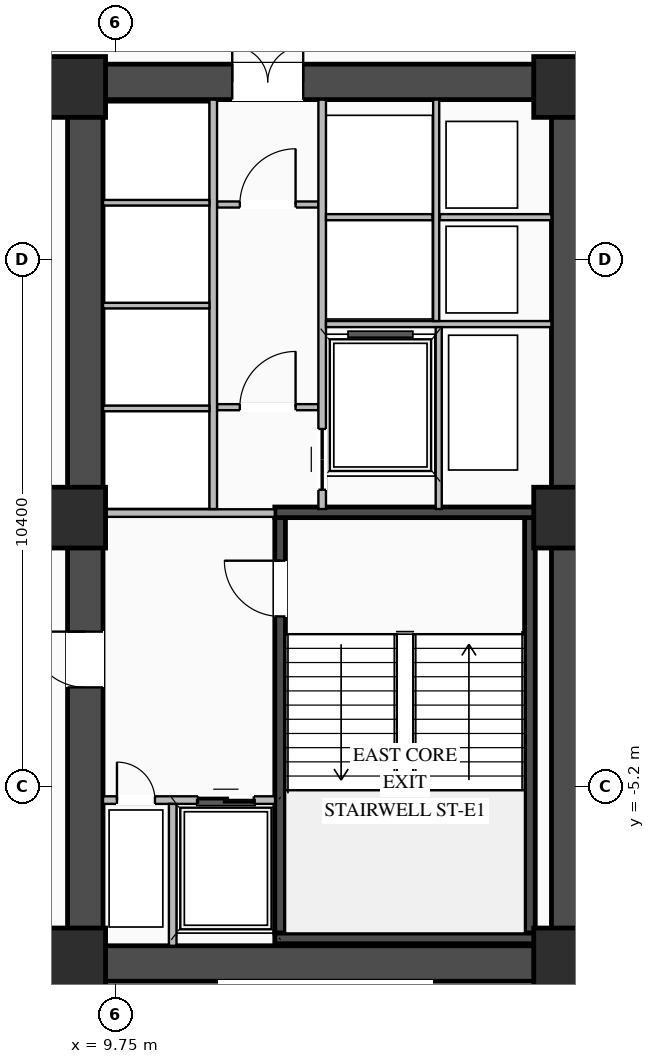
"""IFC4 building model, lengths in metres.
Left out: names, types, materials, properties, quantities, classifications, styles, units other than length and angle.
Written with IfcOpenShell. Run it as: python <this file> out.ifc"""

import sys

from ifc_helpers import new_model, si_unit, direction, frame, frame_2d, origin, origin_2d, place, context, subcontext, project, spatial, rectangle, extrude, element, fill, save


model = new_model("IFC4")
c1 = context("Model", 3, precision=1e-05, world=origin(), true_north=direction((0.0, 1.0)))
c2 = subcontext(c1, "Body", "Model", "MODEL_VIEW")
j1 = project(units=[si_unit("LENGTHUNIT", "METRE"), si_unit("PLANEANGLEUNIT", "RADIAN")], contexts=[c1])
p1 = place(None, origin())
s1 = spatial("IfcSite", under=j1, at=p1, CompositionType="ELEMENT")
p2 = place(p1, origin())
s2 = spatial("IfcBuilding", under=s1, at=p2, CompositionType="ELEMENT")
p3 = place(p2, frame((0.0, 0.0, 9.6)))
s3 = spatial("IfcBuildingStorey", under=s2, at=p3, CompositionType="ELEMENT", Elevation=9.6)
p4 = place(p3, frame((8.8, -8.7, 0.0), z_axis=(0.0, 0.0, 1.0), x_axis=(1.0, 0.0, 0.0)))
e1 = element("IfcWall", 1, at=p4, inside=s3, PredefinedType="SHEAR", context=c2, shape_type="SweptSolid", body=[
    extrude(rectangle(XDim=10.25, YDim=0.7, at=frame_2d((5.125, 0.0))), origin(), (0.0, 0.0, 1.0), 4.25),
])
p5 = place(p3, frame((8.8, 8.7, 0.0), z_axis=(0.0, 0.0, 1.0), x_axis=(1.0, 0.0, 0.0)))
e2 = element("IfcWall", 2, at=p5, inside=s3, PredefinedType="SHEAR", context=c2, shape_type="SweptSolid", body=[
    extrude(rectangle(XDim=10.25, YDim=0.7, at=frame_2d((5.125, 0.0))), origin(), (0.0, 0.0, 1.0), 4.25),
])
p6 = place(p5, frame((3.25, 0.0, 0.0)))
e3 = element("IfcOpeningElement", 3, at=p6, cuts=e2, PredefinedType="OPENING", context=c2, shape_type="SweptSolid", body=[
    extrude(rectangle(XDim=1.4, YDim=2.05, at=frame_2d((0.7, 1.025))), frame((0.0, 0.36, 0.0), z_axis=(0.0, -1.0, 0.0), x_axis=(1.0, 0.0, 0.0)), (0.0, 0.0, 1.0), 0.72),
])
p7 = place(p3, frame((9.15, -8.35, 0.0), z_axis=(0.0, 0.0, 1.0), x_axis=(0.0, 1.0, 0.0)))
e4 = element("IfcWall", 4, at=p7, inside=s3, PredefinedType="SHEAR", context=c2, shape_type="SweptSolid", body=[
    extrude(rectangle(XDim=16.7, YDim=0.7, at=frame_2d((8.35, 0.0))), origin(), (0.0, 0.0, 1.0), 4.25),
])
p8 = place(p7, frame((5.1, 0.0, 0.0)))
e5 = element("IfcOpeningElement", 5, at=p8, cuts=e4, PredefinedType="OPENING", context=c2, shape_type="SweptSolid", body=[
    extrude(rectangle(XDim=1.1, YDim=2.08, at=frame_2d((0.55, 1.04))), frame((0.0, 0.36, 0.0), z_axis=(0.0, -1.0, 0.0), x_axis=(1.0, 0.0, 0.0)), (0.0, 0.0, 1.0), 0.72),
])
p9 = place(p3, frame((18.7, -8.35, 0.0), z_axis=(0.0, 0.0, 1.0), x_axis=(0.0, 1.0, 0.0)))
e6 = element("IfcWall", 6, at=p9, inside=s3, PredefinedType="SHEAR", context=c2, shape_type="SweptSolid", body=[
    extrude(rectangle(XDim=16.7, YDim=0.7, at=frame_2d((8.35, 0.0))), origin(), (0.0, 0.0, 1.0), 4.25),
])
p10 = place(p3, frame((12.995, -8.1, 0.0), z_axis=(0.0, 0.0, 1.0), x_axis=(0.0, 1.0, 0.0)))
e7 = element("IfcWall", 7, at=p10, inside=s3, PredefinedType="SHEAR", context=c2, shape_type="SweptSolid", body=[
    extrude(rectangle(XDim=8.2, YDim=0.21, at=frame_2d((4.1, 0.0))), origin(), (0.0, 0.0, 1.0), 4.25),
])
p11 = place(p10, frame((6.25, 0.0, 0.0)))
e8 = element("IfcOpeningElement", 8, at=p11, cuts=e7, PredefinedType="OPENING", context=c2, shape_type="SweptSolid", body=[
    extrude(rectangle(XDim=1.1, YDim=2.15, at=frame_2d((0.55, 1.075))), frame((0.0, 0.115, 0.0), z_axis=(0.0, -1.0, 0.0), x_axis=(1.0, 0.0, 0.0)), (0.0, 0.0, 1.0), 0.23),
])
p12 = place(p3, frame((17.925, -8.1, 0.0), z_axis=(0.0, 0.0, 1.0), x_axis=(0.0, 1.0, 0.0)))
e9 = element("IfcWall", 9, at=p12, inside=s3, PredefinedType="SHEAR", context=c2, shape_type="SweptSolid", body=[
    extrude(rectangle(XDim=8.2, YDim=0.21, at=frame_2d((4.1, 0.0))), origin(), (0.0, 0.0, 1.0), 4.25),
])
for number, where, z_axis, x_axis in (
    (10, (12.89, -8.205, 0.0), (0.0, 0.0, 1.0), (1.0, 0.0, 0.0)),
    (11, (18.03, 0.205, 0.0), (0.0, 0.0, 1.0), (-1.0, 0.0, 0.0)),
):
    element("IfcWall", number, at=place(p3, frame(where, z_axis=z_axis, x_axis=x_axis)), inside=s3, PredefinedType="SHEAR", context=c2, shape_type="SweptSolid", body=[
        extrude(rectangle(XDim=5.14, YDim=0.21, at=frame_2d((2.57, 0.0))), origin(), (0.0, 0.0, 1.0), 4.25),
    ])
for number, where, z_axis, x_axis in (
    (12, (8.95, -8.6, 0.0), (0.0, 0.0, 1.0), (1.0, 0.0, 0.0)),
    (13, (8.95, 0.1, 0.0), (0.0, 0.0, 1.0), (1.0, 0.0, 0.0)),
    (14, (8.95, 8.6, 0.0), (0.0, 0.0, 1.0), (1.0, 0.0, 0.0)),
    (15, (18.6, -8.6, 0.0), (0.0, 0.0, 1.0), (1.0, 0.0, 0.0)),
    (16, (18.6, 0.1, 0.0), (0.0, 0.0, 1.0), (1.0, 0.0, 0.0)),
    (17, (18.6, 8.6, 0.0), (0.0, 0.0, 1.0), (1.0, 0.0, 0.0)),
):
    element("IfcColumn", number, at=place(p3, frame(where, z_axis=z_axis, x_axis=x_axis)), inside=s3, PredefinedType="COLUMN", context=c2, shape_type="SweptSolid", body=[
        extrude(rectangle(XDim=1.2, YDim=1.2, at=origin_2d()), origin(), (0.0, 0.0, 1.0), 4.5),
    ])
p13 = place(p3, frame((9.5, -5.475, 0.0), z_axis=(0.0, 0.0, 1.0), x_axis=(1.0, 0.0, 0.0)))
e18 = element("IfcWall", 18, at=p13, inside=s3, PredefinedType="STANDARD", context=c2, shape_type="SweptSolid", body=[
    extrude(rectangle(XDim=3.395, YDim=0.15, at=frame_2d((1.698, 0.0))), origin(), (0.0, 0.0, 1.0), 4.23),
])
p14 = place(p13, frame((1.875, 0.0, 0.0)))
e19 = element("IfcOpeningElement", 19, at=p14, cuts=e18, PredefinedType="OPENING", context=c2, shape_type="SweptSolid", body=[
    extrude(rectangle(XDim=1.1, YDim=2.15, at=frame_2d((0.55, 1.075))), frame((0.0, 0.085, 0.0), z_axis=(0.0, -1.0, 0.0), x_axis=(1.0, 0.0, 0.0)), (0.0, 0.0, 1.0), 0.17),
])
p15 = place(p13, frame((0.275, 0.0, 0.0)))
e20 = element("IfcOpeningElement", 20, at=p15, cuts=e18, PredefinedType="OPENING", context=c2, shape_type="SweptSolid", body=[
    extrude(rectangle(XDim=0.75, YDim=2.05, at=frame_2d((0.375, 1.025))), frame((0.0, 0.085, 0.0), z_axis=(0.0, -1.0, 0.0), x_axis=(1.0, 0.0, 0.0)), (0.0, 0.0, 1.0), 0.17),
])
p16 = place(p3, frame((10.875, -8.35, 0.0), z_axis=(0.0, 0.0, 1.0), x_axis=(0.0, 1.0, 0.0)))
e21 = element("IfcWall", 21, at=p16, inside=s3, PredefinedType="STANDARD", context=c2, shape_type="SweptSolid", body=[
    extrude(rectangle(XDim=2.8, YDim=0.15, at=frame_2d((1.4, 0.0))), origin(), (0.0, 0.0, 1.0), 4.23),
])
p17 = place(p3, frame((9.5, 0.19, 0.0), z_axis=(0.0, 0.0, 1.0), x_axis=(1.0, 0.0, 0.0)))
e22 = element("IfcWall", 22, at=p17, inside=s3, PredefinedType="STANDARD", context=c2, shape_type="SweptSolid", body=[
    extrude(rectangle(XDim=3.39, YDim=0.15, at=frame_2d((1.695, 0.0))), origin(), (0.0, 0.0, 1.0), 3.525),
])
p18 = place(p3, frame((11.75, 2.28, 0.0), z_axis=(0.0, 0.0, 1.0), x_axis=(1.0, 0.0, 0.0)))
e23 = element("IfcWall", 23, at=p18, inside=s3, PredefinedType="STANDARD", context=c2, shape_type="SweptSolid", body=[
    extrude(rectangle(XDim=2.0, YDim=0.12, at=frame_2d((1.0, 0.0))), origin(), (0.0, 0.0, 1.0), 4.23),
])
p19 = place(p18, frame((0.45, 0.0, 0.0)))
e24 = element("IfcOpeningElement", 24, at=p19, cuts=e23, PredefinedType="OPENING", context=c2, shape_type="SweptSolid", body=[
    extrude(rectangle(XDim=1.1, YDim=2.1, at=frame_2d((0.55, 1.05))), frame((0.0, 0.07, 0.0), z_axis=(0.0, -1.0, 0.0), x_axis=(1.0, 0.0, 0.0)), (0.0, 0.0, 1.0), 0.14),
])
p20 = place(p3, frame((11.75, 6.28, 0.0), z_axis=(0.0, 0.0, 1.0), x_axis=(1.0, 0.0, 0.0)))
e25 = element("IfcWall", 25, at=p20, inside=s3, PredefinedType="STANDARD", context=c2, shape_type="SweptSolid", body=[
    extrude(rectangle(XDim=2.0, YDim=0.12, at=frame_2d((1.0, 0.0))), origin(), (0.0, 0.0, 1.0), 4.23),
])
p21 = place(p20, frame((0.45, 0.0, 0.0)))
e26 = element("IfcOpeningElement", 26, at=p21, cuts=e25, PredefinedType="OPENING", context=c2, shape_type="SweptSolid", body=[
    extrude(rectangle(XDim=1.1, YDim=2.1, at=frame_2d((0.55, 1.05))), frame((0.0, 0.07, 0.0), z_axis=(0.0, -1.0, 0.0), x_axis=(1.0, 0.0, 0.0)), (0.0, 0.0, 1.0), 0.14),
])
p22 = place(p3, frame((11.675, 0.27, 0.0), z_axis=(0.0, 0.0, 1.0), x_axis=(0.0, 1.0, 0.0)))
e27 = element("IfcWall", 27, at=p22, inside=s3, PredefinedType="STANDARD", context=c2, shape_type="SweptSolid", body=[
    extrude(rectangle(XDim=8.08, YDim=0.15, at=frame_2d((4.04, 0.0))), origin(), (0.0, 0.0, 1.0), 4.23),
])
for number, where, z_axis, x_axis in (
    (28, (9.5, 2.255, 0.0), (0.0, 0.0, 1.0), (1.0, 0.0, 0.0)),
    (29, (9.5, 4.285, 0.0), (0.0, 0.0, 1.0), (1.0, 0.0, 0.0)),
    (30, (9.5, 6.315, 0.0), (0.0, 0.0, 1.0), (1.0, 0.0, 0.0)),
):
    element("IfcWall", number, at=place(p3, frame(where, z_axis=z_axis, x_axis=x_axis)), inside=s3, PredefinedType="STANDARD", context=c2, shape_type="SweptSolid", body=[
        extrude(rectangle(XDim=2.1, YDim=0.11, at=frame_2d((1.05, 0.0))), origin(), (0.0, 0.0, 1.0), 4.23),
    ])
p23 = place(p3, frame((13.825, 0.27, 0.0), z_axis=(0.0, 0.0, 1.0), x_axis=(0.0, 1.0, 0.0)))
e31 = element("IfcWall", 31, at=p23, inside=s3, PredefinedType="STANDARD", context=c2, shape_type="SweptSolid", body=[
    extrude(rectangle(XDim=8.08, YDim=0.15, at=frame_2d((4.04, 0.0))), origin(), (0.0, 0.0, 1.0), 4.23),
])
p24 = place(p23, frame((0.38, 0.0, 0.0)))
e32 = element("IfcOpeningElement", 32, at=p24, cuts=e31, PredefinedType="OPENING", context=c2, shape_type="SweptSolid", body=[
    extrude(rectangle(XDim=1.2, YDim=2.1, at=frame_2d((0.6, 1.05))), frame((0.0, 0.085, 0.0), z_axis=(0.0, -1.0, 0.0), x_axis=(1.0, 0.0, 0.0)), (0.0, 0.0, 1.0), 0.17),
])
p25 = place(p3, frame((13.9, 3.92, 0.0), z_axis=(0.0, 0.0, 1.0), x_axis=(1.0, 0.0, 0.0)))
e33 = element("IfcWall", 33, at=p25, inside=s3, PredefinedType="STANDARD", context=c2, shape_type="SweptSolid", body=[
    extrude(rectangle(XDim=4.45, YDim=0.12, at=frame_2d((2.225, 0.0))), origin(), (0.0, 0.0, 1.0), 4.23),
])
p26 = place(p3, frame((16.15, 6.03, 0.0), z_axis=(0.0, 0.0, 1.0), x_axis=(1.0, 0.0, 0.0)))
e34 = element("IfcWall", 34, at=p26, inside=s3, PredefinedType="STANDARD", context=c2, shape_type="SweptSolid", body=[
    extrude(rectangle(XDim=2.2, YDim=0.12, at=frame_2d((1.1, 0.0))), origin(), (0.0, 0.0, 1.0), 4.23),
])
p27 = place(p3, frame((16.075, 3.98, 0.0), z_axis=(0.0, 0.0, 1.0), x_axis=(0.0, 1.0, 0.0)))
e35 = element("IfcWall", 35, at=p27, inside=s3, PredefinedType="STANDARD", context=c2, shape_type="SweptSolid", body=[
    extrude(rectangle(XDim=4.37, YDim=0.12, at=frame_2d((2.185, 0.0))), origin(), (0.0, 0.0, 1.0), 4.23),
])
p28 = place(p3, frame((13.9, 6.03, 0.0), z_axis=(0.0, 0.0, 1.0), x_axis=(1.0, 0.0, 0.0)))
e36 = element("IfcWall", 36, at=p28, inside=s3, PredefinedType="STANDARD", context=c2, shape_type="SweptSolid", body=[
    extrude(rectangle(XDim=2.1, YDim=0.12, at=frame_2d((1.05, 0.0))), origin(), (0.0, 0.0, 1.0), 4.23),
])
p29 = place(p3, frame((16.125, 0.27, 0.0), z_axis=(0.0, 0.0, 1.0), x_axis=(0.0, 1.0, 0.0)))
e37 = element("IfcWall", 37, at=p29, inside=s3, PredefinedType="STANDARD", context=c2, shape_type="SweptSolid", body=[
    extrude(rectangle(XDim=3.59, YDim=0.12, at=frame_2d((1.795, 0.0))), origin(), (0.0, 0.0, 1.0), 4.23),
])
p30 = place(p11, origin())
e38 = element("IfcDoor", 38, at=p30, inside=s3, OperationType="SINGLE_SWING_RIGHT", PredefinedType="DOOR", context=c2, shape_type="SweptSolid", body=[
    extrude(rectangle(XDim=1.1, YDim=2.15, at=frame_2d((0.55, 1.075))), frame((0.0, 0.025, 0.0), z_axis=(0.0, -1.0, 0.0), x_axis=(1.0, 0.0, 0.0)), (0.0, 0.0, 1.0), 0.05),
])
fill(e8, e38)
p31 = place(p14, origin())
e39 = element("IfcDoor", 39, at=p31, inside=s3, OperationType="DOUBLE_DOOR_SLIDING", PredefinedType="DOOR", context=c2, shape_type="SweptSolid", body=[
    extrude(rectangle(XDim=1.1, YDim=2.15, at=frame_2d((0.55, 1.075))), frame((0.0, 0.025, 0.0), z_axis=(0.0, -1.0, 0.0), x_axis=(1.0, 0.0, 0.0)), (0.0, 0.0, 1.0), 0.05),
])
fill(e19, e39)
p32 = place(p15, origin())
e40 = element("IfcDoor", 40, at=p32, inside=s3, OperationType="SINGLE_SWING_LEFT", PredefinedType="DOOR", context=c2, shape_type="SweptSolid", body=[
    extrude(rectangle(XDim=0.75, YDim=2.05, at=frame_2d((0.375, 1.025))), frame((0.0, 0.025, 0.0), z_axis=(0.0, -1.0, 0.0), x_axis=(1.0, 0.0, 0.0)), (0.0, 0.0, 1.0), 0.05),
])
fill(e20, e40)
p33 = place(p8, origin())
e41 = element("IfcDoor", 41, at=p33, inside=s3, OperationType="SINGLE_SWING_RIGHT", PredefinedType="DOOR", context=c2, shape_type="SweptSolid", body=[
    extrude(rectangle(XDim=1.1, YDim=2.08, at=frame_2d((0.55, 1.04))), frame((0.0, -0.255, 0.0), z_axis=(0.0, -1.0, 0.0), x_axis=(1.0, 0.0, 0.0)), (0.0, 0.0, 1.0), 0.05),
])
fill(e5, e41)
p34 = place(p19, origin())
e42 = element("IfcDoor", 42, at=p34, inside=s3, OperationType="SINGLE_SWING_RIGHT", PredefinedType="DOOR", context=c2, shape_type="SweptSolid", body=[
    extrude(rectangle(XDim=1.1, YDim=2.1, at=frame_2d((0.55, 1.05))), frame((0.0, 0.025, 0.0), z_axis=(0.0, -1.0, 0.0), x_axis=(1.0, 0.0, 0.0)), (0.0, 0.0, 1.0), 0.05),
])
fill(e24, e42)
p35 = place(p21, origin())
e43 = element("IfcDoor", 43, at=p35, inside=s3, OperationType="SINGLE_SWING_RIGHT", PredefinedType="DOOR", context=c2, shape_type="SweptSolid", body=[
    extrude(rectangle(XDim=1.1, YDim=2.1, at=frame_2d((0.55, 1.05))), frame((0.0, 0.025, 0.0), z_axis=(0.0, -1.0, 0.0), x_axis=(1.0, 0.0, 0.0)), (0.0, 0.0, 1.0), 0.05),
])
fill(e26, e43)
p36 = place(p6, origin())
e44 = element("IfcDoor", 44, at=p36, inside=s3, OperationType="DOUBLE_DOOR_SINGLE_SWING", PredefinedType="DOOR", context=c2, shape_type="SweptSolid", body=[
    extrude(rectangle(XDim=1.4, YDim=2.05, at=frame_2d((0.7, 1.025))), frame((0.0, 0.295, 0.0), z_axis=(0.0, -1.0, 0.0), x_axis=(1.0, 0.0, 0.0)), (0.0, 0.0, 1.0), 0.05),
])
fill(e3, e44)
p37 = place(p24, origin())
e45 = element("IfcDoor", 45, at=p37, inside=s3, OperationType="DOUBLE_DOOR_SLIDING", PredefinedType="DOOR", context=c2, shape_type="SweptSolid", body=[
    extrude(rectangle(XDim=1.2, YDim=2.1, at=frame_2d((0.6, 1.05))), frame((0.0, 0.025, 0.0), z_axis=(0.0, -1.0, 0.0), x_axis=(1.0, 0.0, 0.0)), (0.0, 0.0, 1.0), 0.05),
])
fill(e32, e45)
save(model, sys.argv[1])
